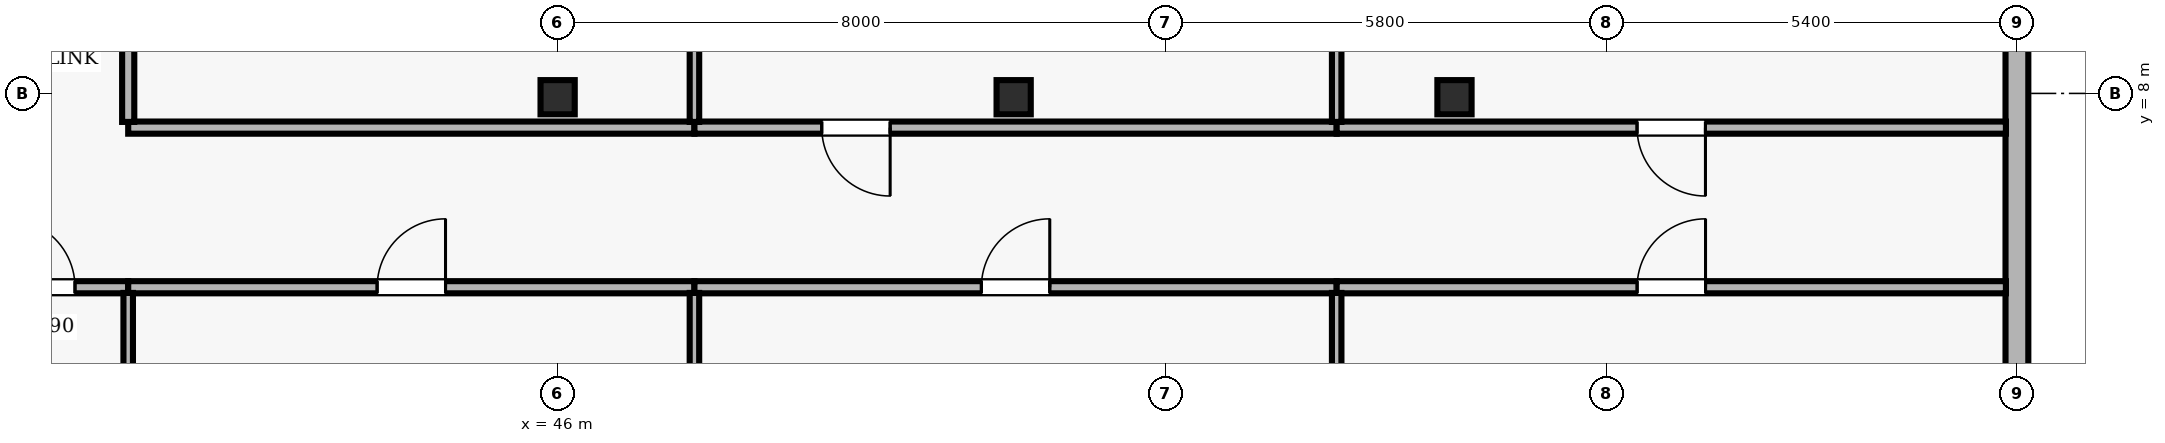
"""IFC4 building model, lengths in metres.
Left out: names, types, materials, properties, quantities, classifications, styles, units other than length and angle.
Written with IfcOpenShell. Run it as: python <this file> out.ifc"""

import sys

from ifc_helpers import new_model, si_unit, direction, frame, frame_2d, origin, origin_2d, place, context, subcontext, project, spatial, rectangle, hollow_rectangle, extrude, element, fill, save


model = new_model("IFC4")
c1 = context("Model", 3, precision=1e-05, world=origin(), true_north=direction((0.0, 1.0)))
c2 = subcontext(c1, "Body", "Model", "MODEL_VIEW")
j1 = project(units=[si_unit("LENGTHUNIT", "METRE"), si_unit("PLANEANGLEUNIT", "RADIAN")], contexts=[c1])
p1 = place(None, origin())
s1 = spatial("IfcSite", under=j1, at=p1, CompositionType="ELEMENT")
p2 = place(p1, origin())
s2 = spatial("IfcBuilding", under=s1, at=p2, CompositionType="ELEMENT")
p3 = place(p2, frame((0.0, 0.0, 226.5)))
s3 = spatial("IfcBuildingStorey", under=s2, at=p3, CompositionType="ELEMENT", Elevation=226.5)
for number, where, z_axis, x_axis in (
    (1, (46.0, 7.95, 0.0), (0.0, 0.0, 1.0), (1.0, 0.0, 0.0)),
    (2, (52.0, 7.95, 0.0), (0.0, 0.0, 1.0), (1.0, 0.0, 0.0)),
    (3, (57.8, 7.95, 0.0), (0.0, 0.0, 1.0), (1.0, 0.0, 0.0)),
):
    element("IfcColumn", number, at=place(p3, frame(where, z_axis=z_axis, x_axis=x_axis)), inside=s3, PredefinedType="COLUMN", context=c2, shape_type="SweptSolid", body=[
        extrude(hollow_rectangle(XDim=0.45, YDim=0.45, WallThickness=0.02, at=origin_2d()), origin(), (0.0, 0.0, 1.0), 3.9),
    ])
p4 = place(p3, frame((65.2, 2.5, 0.0), z_axis=(0.0, 0.0, 1.0), x_axis=(0.0, 1.0, 0.0)))
e4 = element("IfcWall", 4, at=p4, inside=s3, PredefinedType="SOLIDWALL", context=c2, shape_type="SweptSolid", body=[
    extrude(rectangle(XDim=11.0, YDim=0.3, at=frame_2d((5.5, 0.0))), origin(), (0.0, 0.0, 1.0), 3.69),
])
p5 = place(p4, frame((7.35, 0.0, 0.9)))
e5 = element("IfcOpeningElement", 5, at=p5, cuts=e4, PredefinedType="OPENING", context=c2, shape_type="SweptSolid", body=[
    extrude(rectangle(XDim=1.8, YDim=2.2, at=frame_2d((0.9, 1.1))), frame((0.0, 0.16, 0.0), z_axis=(0.0, -1.0, 0.0), x_axis=(1.0, 0.0, 0.0)), (0.0, 0.0, 1.0), 0.32),
])
p6 = place(p3, frame((38.05, 5.45, 0.0), z_axis=(0.0, 0.0, 1.0), x_axis=(1.0, 0.0, 0.0)))
e6 = element("IfcWall", 6, at=p6, inside=s3, PredefinedType="PARTITIONING", context=c2, shape_type="SweptSolid", body=[
    extrude(rectangle(XDim=2.3, YDim=0.16, at=frame_2d((1.15, 0.0))), origin(), (0.0, 0.0, 1.0), 3.372),
])
p7 = place(p6, frame((0.7, 0.0, 0.0)))
e7 = element("IfcOpeningElement", 7, at=p7, cuts=e6, PredefinedType="OPENING", context=c2, shape_type="SweptSolid", body=[
    extrude(rectangle(XDim=0.9, YDim=2.1, at=frame_2d((0.45, 1.05))), frame((0.0, 0.09, 0.0), z_axis=(0.0, -1.0, 0.0), x_axis=(1.0, 0.0, 0.0)), (0.0, 0.0, 1.0), 0.18),
])
p8 = place(p3, frame((40.35, 5.45, 0.0), z_axis=(0.0, 0.0, 1.0), x_axis=(1.0, 0.0, 0.0)))
e8 = element("IfcWall", 8, at=p8, inside=s3, PredefinedType="PARTITIONING", context=c2, shape_type="SweptSolid", body=[
    extrude(rectangle(XDim=7.45, YDim=0.16, at=frame_2d((3.725, 0.0))), origin(), (0.0, 0.0, 1.0), 3.372),
])
p9 = place(p8, frame((3.275, 0.0, 0.0)))
e9 = element("IfcOpeningElement", 9, at=p9, cuts=e8, PredefinedType="OPENING", context=c2, shape_type="SweptSolid", body=[
    extrude(rectangle(XDim=0.9, YDim=2.1, at=frame_2d((0.45, 1.05))), frame((0.0, 0.09, 0.0), z_axis=(0.0, -1.0, 0.0), x_axis=(1.0, 0.0, 0.0)), (0.0, 0.0, 1.0), 0.18),
])
p10 = place(p3, frame((47.8, 5.45, 0.0), z_axis=(0.0, 0.0, 1.0), x_axis=(1.0, 0.0, 0.0)))
e10 = element("IfcWall", 10, at=p10, inside=s3, PredefinedType="PARTITIONING", context=c2, shape_type="SweptSolid", body=[
    extrude(rectangle(XDim=8.45, YDim=0.16, at=frame_2d((4.225, 0.0))), origin(), (0.0, 0.0, 1.0), 3.372),
])
p11 = place(p10, frame((3.775, 0.0, 0.0)))
e11 = element("IfcOpeningElement", 11, at=p11, cuts=e10, PredefinedType="OPENING", context=c2, shape_type="SweptSolid", body=[
    extrude(rectangle(XDim=0.9, YDim=2.1, at=frame_2d((0.45, 1.05))), frame((0.0, 0.09, 0.0), z_axis=(0.0, -1.0, 0.0), x_axis=(1.0, 0.0, 0.0)), (0.0, 0.0, 1.0), 0.18),
])
p12 = place(p3, frame((47.8, 7.55, 0.0), z_axis=(0.0, 0.0, 1.0), x_axis=(-1.0, 0.0, 0.0)))
e12 = element("IfcWall", 12, at=p12, inside=s3, PredefinedType="PARTITIONING", context=c2, shape_type="SweptSolid", body=[
    extrude(rectangle(XDim=7.45, YDim=0.16, at=frame_2d((3.725, 0.0))), origin(), (0.0, 0.0, 1.0), 3.146),
])
p13 = place(p3, frame((56.25, 5.45, 0.0), z_axis=(0.0, 0.0, 1.0), x_axis=(1.0, 0.0, 0.0)))
e13 = element("IfcWall", 13, at=p13, inside=s3, PredefinedType="PARTITIONING", context=c2, shape_type="SweptSolid", body=[
    extrude(rectangle(XDim=8.805, YDim=0.16, at=frame_2d((4.402, 0.0))), origin(), (0.0, 0.0, 1.0), 3.372),
])
p14 = place(p13, frame((3.953, 0.0, 0.0)))
e14 = element("IfcOpeningElement", 14, at=p14, cuts=e13, PredefinedType="OPENING", context=c2, shape_type="SweptSolid", body=[
    extrude(rectangle(XDim=0.9, YDim=2.1, at=frame_2d((0.45, 1.05))), frame((0.0, 0.09, 0.0), z_axis=(0.0, -1.0, 0.0), x_axis=(1.0, 0.0, 0.0)), (0.0, 0.0, 1.0), 0.18),
])
p15 = place(p3, frame((56.25, 7.55, 0.0), z_axis=(0.0, 0.0, 1.0), x_axis=(-1.0, 0.0, 0.0)))
e15 = element("IfcWall", 15, at=p15, inside=s3, PredefinedType="PARTITIONING", context=c2, shape_type="SweptSolid", body=[
    extrude(rectangle(XDim=8.45, YDim=0.16, at=frame_2d((4.225, 0.0))), origin(), (0.0, 0.0, 1.0), 3.146),
])
p16 = place(p15, frame((5.875, 0.0, 0.0)))
e16 = element("IfcOpeningElement", 16, at=p16, cuts=e15, PredefinedType="OPENING", context=c2, shape_type="SweptSolid", body=[
    extrude(rectangle(XDim=0.9, YDim=2.1, at=frame_2d((0.45, 1.05))), frame((0.0, 0.09, 0.0), z_axis=(0.0, -1.0, 0.0), x_axis=(1.0, 0.0, 0.0)), (0.0, 0.0, 1.0), 0.18),
])
p17 = place(p3, frame((65.055, 7.55, 0.0), z_axis=(0.0, 0.0, 1.0), x_axis=(-1.0, 0.0, 0.0)))
e17 = element("IfcWall", 17, at=p17, inside=s3, PredefinedType="PARTITIONING", context=c2, shape_type="SweptSolid", body=[
    extrude(rectangle(XDim=8.805, YDim=0.16, at=frame_2d((4.402, 0.0))), origin(), (0.0, 0.0, 1.0), 3.146),
])
p18 = place(p17, frame((3.953, 0.0, 0.0)))
e18 = element("IfcOpeningElement", 18, at=p18, cuts=e17, PredefinedType="OPENING", context=c2, shape_type="SweptSolid", body=[
    extrude(rectangle(XDim=0.9, YDim=2.1, at=frame_2d((0.45, 1.05))), frame((0.0, 0.09, 0.0), z_axis=(0.0, -1.0, 0.0), x_axis=(1.0, 0.0, 0.0)), (0.0, 0.0, 1.0), 0.18),
])
p19 = place(p3, frame((40.35, 0.145, 0.0), z_axis=(0.0, 0.0, 1.0), x_axis=(0.0, 1.0, 0.0)))
e19 = element("IfcWall", 19, at=p19, inside=s3, PredefinedType="PARTITIONING", context=c2, shape_type="SweptSolid", body=[
    extrude(rectangle(XDim=5.23, YDim=0.125, at=frame_2d((2.615, 0.0))), origin(), (0.0, 0.0, 1.0), 3.69),
])
p20 = place(p3, frame((40.35, 7.625, 0.0), z_axis=(0.0, 0.0, 1.0), x_axis=(0.0, 1.0, 0.0)))
e20 = element("IfcWall", 20, at=p20, inside=s3, PredefinedType="PARTITIONING", context=c2, shape_type="SweptSolid", body=[
    extrude(rectangle(XDim=8.3, YDim=0.16, at=frame_2d((4.15, 0.0))), origin(), (0.0, 0.0, 1.0), 3.69),
])
p21 = place(p20, frame((3.7, 0.0, 0.0)))
e21 = element("IfcOpeningElement", 21, at=p21, cuts=e20, PredefinedType="OPENING", context=c2, shape_type="SweptSolid", body=[
    extrude(rectangle(XDim=0.9, YDim=2.1, at=frame_2d((0.45, 1.05))), frame((0.0, 0.09, 0.0), z_axis=(0.0, -1.0, 0.0), x_axis=(1.0, 0.0, 0.0)), (0.0, 0.0, 1.0), 0.18),
])
p22 = place(p3, frame((47.8, 0.145, 0.0), z_axis=(0.0, 0.0, 1.0), x_axis=(0.0, 1.0, 0.0)))
e22 = element("IfcWall", 22, at=p22, inside=s3, PredefinedType="PARTITIONING", context=c2, shape_type="SweptSolid", body=[
    extrude(rectangle(XDim=5.23, YDim=0.125, at=frame_2d((2.615, 0.0))), origin(), (0.0, 0.0, 1.0), 3.69),
])
p23 = place(p3, frame((47.8, 7.625, 0.0), z_axis=(0.0, 0.0, 1.0), x_axis=(0.0, 1.0, 0.0)))
e23 = element("IfcWall", 23, at=p23, inside=s3, PredefinedType="PARTITIONING", context=c2, shape_type="SweptSolid", body=[
    extrude(rectangle(XDim=8.23, YDim=0.125, at=frame_2d((4.115, 0.0))), origin(), (0.0, 0.0, 1.0), 3.69),
])
p24 = place(p3, frame((56.25, 0.145, 0.0), z_axis=(0.0, 0.0, 1.0), x_axis=(0.0, 1.0, 0.0)))
e24 = element("IfcWall", 24, at=p24, inside=s3, PredefinedType="PARTITIONING", context=c2, shape_type="SweptSolid", body=[
    extrude(rectangle(XDim=5.23, YDim=0.125, at=frame_2d((2.615, 0.0))), origin(), (0.0, 0.0, 1.0), 3.69),
])
p25 = place(p3, frame((56.25, 7.625, 0.0), z_axis=(0.0, 0.0, 1.0), x_axis=(0.0, 1.0, 0.0)))
e25 = element("IfcWall", 25, at=p25, inside=s3, PredefinedType="PARTITIONING", context=c2, shape_type="SweptSolid", body=[
    extrude(rectangle(XDim=8.23, YDim=0.125, at=frame_2d((4.115, 0.0))), origin(), (0.0, 0.0, 1.0), 3.69),
])
p26 = place(p7, origin())
e26 = element("IfcDoor", 26, at=p26, inside=s3, OperationType="SINGLE_SWING_LEFT", PredefinedType="DOOR", context=c2, shape_type="SweptSolid", body=[
    extrude(rectangle(XDim=0.9, YDim=2.1, at=frame_2d((0.45, 1.05))), frame((0.0, 0.025, 0.0), z_axis=(0.0, -1.0, 0.0), x_axis=(1.0, 0.0, 0.0)), (0.0, 0.0, 1.0), 0.05),
])
fill(e7, e26)
p27 = place(p9, origin())
e27 = element("IfcDoor", 27, at=p27, inside=s3, OperationType="SINGLE_SWING_RIGHT", PredefinedType="DOOR", context=c2, shape_type="SweptSolid", body=[
    extrude(rectangle(XDim=0.9, YDim=2.1, at=frame_2d((0.45, 1.05))), frame((0.0, 0.025, 0.0), z_axis=(0.0, -1.0, 0.0), x_axis=(1.0, 0.0, 0.0)), (0.0, 0.0, 1.0), 0.05),
])
fill(e9, e27)
p28 = place(p11, origin())
e28 = element("IfcDoor", 28, at=p28, inside=s3, OperationType="SINGLE_SWING_RIGHT", PredefinedType="DOOR", context=c2, shape_type="SweptSolid", body=[
    extrude(rectangle(XDim=0.9, YDim=2.1, at=frame_2d((0.45, 1.05))), frame((0.0, 0.025, 0.0), z_axis=(0.0, -1.0, 0.0), x_axis=(1.0, 0.0, 0.0)), (0.0, 0.0, 1.0), 0.05),
])
fill(e11, e28)
p29 = place(p16, origin())
e29 = element("IfcDoor", 29, at=p29, inside=s3, OperationType="SINGLE_SWING_LEFT", PredefinedType="DOOR", context=c2, shape_type="SweptSolid", body=[
    extrude(rectangle(XDim=0.9, YDim=2.1, at=frame_2d((0.45, 1.05))), frame((0.0, 0.025, 0.0), z_axis=(0.0, -1.0, 0.0), x_axis=(1.0, 0.0, 0.0)), (0.0, 0.0, 1.0), 0.05),
])
fill(e16, e29)
p30 = place(p14, origin())
e30 = element("IfcDoor", 30, at=p30, inside=s3, OperationType="SINGLE_SWING_RIGHT", PredefinedType="DOOR", context=c2, shape_type="SweptSolid", body=[
    extrude(rectangle(XDim=0.9, YDim=2.1, at=frame_2d((0.45, 1.05))), frame((0.0, 0.025, 0.0), z_axis=(0.0, -1.0, 0.0), x_axis=(1.0, 0.0, 0.0)), (0.0, 0.0, 1.0), 0.05),
])
fill(e14, e30)
p31 = place(p18, origin())
e31 = element("IfcDoor", 31, at=p31, inside=s3, OperationType="SINGLE_SWING_LEFT", PredefinedType="DOOR", context=c2, shape_type="SweptSolid", body=[
    extrude(rectangle(XDim=0.9, YDim=2.1, at=frame_2d((0.45, 1.05))), frame((0.0, 0.025, 0.0), z_axis=(0.0, -1.0, 0.0), x_axis=(1.0, 0.0, 0.0)), (0.0, 0.0, 1.0), 0.05),
])
fill(e18, e31)
save(model, sys.argv[1])
